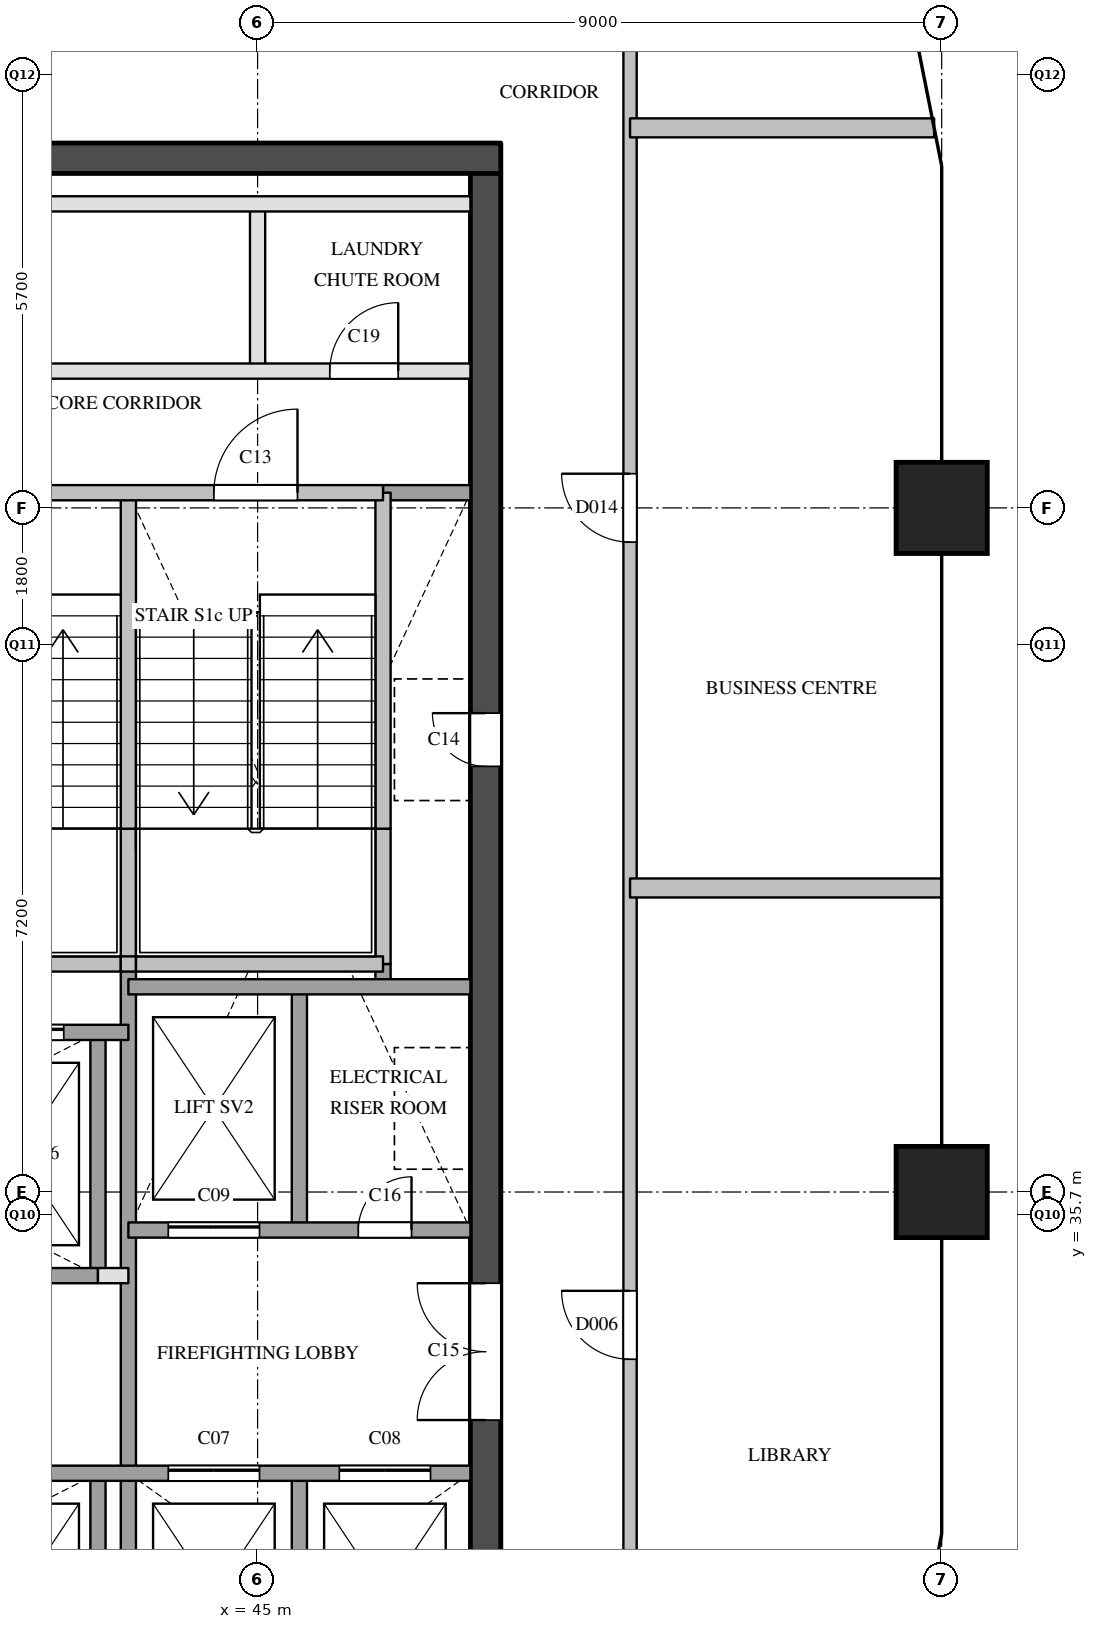
"""IFC4 building model, lengths in metres.
Left out: names, types, materials, properties, quantities, classifications, styles, units other than length and angle.
Written with IfcOpenShell. Run it as: python <this file> out.ifc"""

import sys

from ifc_helpers import new_model, si_unit, direction, frame, frame_2d, origin, origin_2d, place, context, subcontext, project, spatial, rectangle, extrude, element, fill, save


model = new_model("IFC4")
c1 = context("Model", 3, precision=1e-05, world=origin(), true_north=direction((0.0, 1.0)))
c2 = subcontext(c1, "Body", "Model", "MODEL_VIEW")
j1 = project(units=[si_unit("LENGTHUNIT", "METRE"), si_unit("PLANEANGLEUNIT", "RADIAN")], contexts=[c1])
p1 = place(None, origin())
s1 = spatial("IfcSite", under=j1, at=p1, CompositionType="ELEMENT")
p2 = place(p1, origin())
s2 = spatial("IfcBuilding", under=s1, at=p2, CompositionType="ELEMENT")
p3 = place(p2, frame((0.0, 0.0, 242.3)))
s3 = spatial("IfcBuildingStorey", under=s2, at=p3, CompositionType="ELEMENT", Elevation=242.3)
for number, where, z_axis, x_axis in (
    (1, (54.0, 36.0, 0.0), (0.0, 0.0, 1.0), (1.0, 0.0, 0.0)),
    (2, (54.0, 45.0, 0.0), (0.0, 0.0, 1.0), (1.0, 0.0, 0.0)),
):
    element("IfcColumn", number, at=place(p3, frame(where, z_axis=z_axis, x_axis=x_axis)), inside=s3, PredefinedType="COLUMN", context=c2, shape_type="SweptSolid", body=[
        extrude(rectangle(XDim=1.2, YDim=1.2, at=origin_2d()), origin(), (0.0, 0.0, 1.0), 3.9),
    ])
p4 = place(p3, frame((36.2, 49.6, 0.0), z_axis=(0.0, 0.0, 1.0), x_axis=(1.0, 0.0, 0.0)))
e3 = element("IfcWall", 3, at=p4, inside=s3, PredefinedType="SHEAR", context=c2, shape_type="SweptSolid", body=[
    extrude(rectangle(XDim=12.0, YDim=0.4, at=frame_2d((6.0, 0.0))), origin(), (0.0, 0.0, 1.0), 3.6),
])
p5 = place(p3, frame((48.0, 29.1, 0.0), z_axis=(0.0, 0.0, 1.0), x_axis=(0.0, 1.0, 0.0)))
e4 = element("IfcWall", 4, at=p5, inside=s3, PredefinedType="SHEAR", context=c2, shape_type="SweptSolid", body=[
    extrude(rectangle(XDim=20.3, YDim=0.4, at=frame_2d((10.15, 0.0))), origin(), (0.0, 0.0, 1.0), 3.6),
])
p6 = place(p5, frame((12.5, 0.0, 0.0)))
e5 = element("IfcOpeningElement", 5, at=p6, cuts=e4, PredefinedType="OPENING", context=c2, shape_type="SweptSolid", body=[
    extrude(rectangle(XDim=0.7, YDim=2.1, at=frame_2d((0.35, 1.05))), frame((0.0, 0.21, 0.0), z_axis=(0.0, -1.0, 0.0), x_axis=(1.0, 0.0, 0.0)), (0.0, 0.0, 1.0), 0.42),
])
p7 = place(p5, frame((3.9, 0.0, 0.0)))
e6 = element("IfcOpeningElement", 6, at=p7, cuts=e4, PredefinedType="OPENING", context=c2, shape_type="SweptSolid", body=[
    extrude(rectangle(XDim=1.8, YDim=2.1, at=frame_2d((0.9, 1.05))), frame((0.0, 0.21, 0.0), z_axis=(0.0, -1.0, 0.0), x_axis=(1.0, 0.0, 0.0)), (0.0, 0.0, 1.0), 0.42),
])
p8 = place(p3, frame((42.9, 29.1, 0.0), z_axis=(0.0, 0.0, 1.0), x_axis=(0.0, 1.0, 0.0)))
e7 = element("IfcWall", 7, at=p8, inside=s3, PredefinedType="SOLIDWALL", context=c2, shape_type="SweptSolid", body=[
    extrude(rectangle(XDim=3.2, YDim=0.2, at=frame_2d((1.6, 0.0))), origin(), (0.0, 0.0, 1.0), 3.6),
])
p9 = place(p3, frame((42.9, 34.9, 0.0), z_axis=(0.0, 0.0, 1.0), x_axis=(0.0, 1.0, 0.0)))
e8 = element("IfcWall", 8, at=p9, inside=s3, PredefinedType="SOLIDWALL", context=c2, shape_type="SweptSolid", body=[
    extrude(rectangle(XDim=3.2, YDim=0.2, at=frame_2d((1.6, 0.0))), origin(), (0.0, 0.0, 1.0), 3.6),
])
p10 = place(p3, frame((43.3, 29.1, 0.0), z_axis=(0.0, 0.0, 1.0), x_axis=(0.0, 1.0, 0.0)))
e9 = element("IfcWall", 9, at=p10, inside=s3, PredefinedType="SOLIDWALL", context=c2, shape_type="SweptSolid", body=[
    extrude(rectangle(XDim=9.9, YDim=0.2, at=frame_2d((4.95, 0.0))), origin(), (0.0, 0.0, 1.0), 3.6),
])
p11 = place(p3, frame((43.3, 39.0, 0.0), z_axis=(0.0, 0.0, 1.0), x_axis=(0.0, 1.0, 0.0)))
e10 = element("IfcWall", 10, at=p11, inside=s3, PredefinedType="SOLIDWALL", context=c2, shape_type="SweptSolid", body=[
    extrude(rectangle(XDim=1.78, YDim=0.2, at=frame_2d((0.89, 0.0))), origin(), (0.0, 0.0, 1.0), 3.6),
])
p12 = place(p3, frame((43.3, 40.78, 0.0), z_axis=(0.0, 0.0, 1.0), x_axis=(0.0, 1.0, 0.0)))
e11 = element("IfcWall", 11, at=p12, inside=s3, PredefinedType="SOLIDWALL", context=c2, shape_type="SweptSolid", body=[
    extrude(rectangle(XDim=4.42, YDim=0.2, at=frame_2d((2.21, 0.0))), origin(), (0.0, 0.0, 1.0), 3.6),
])
p13 = place(p3, frame((45.0, 46.8, 0.0), z_axis=(0.0, 0.0, 1.0), x_axis=(0.0, 1.0, 0.0)))
e12 = element("IfcWall", 12, at=p13, inside=s3, PredefinedType="PARTITIONING", context=c2, shape_type="SweptSolid", body=[
    extrude(rectangle(XDim=2.2, YDim=0.2, at=frame_2d((1.1, 0.0))), origin(), (0.0, 0.0, 1.0), 3.6),
])
for number, where, z_axis, x_axis in (
    (13, (45.55, 29.1, 0.0), (0.0, 0.0, 1.0), (0.0, 1.0, 0.0)),
    (14, (45.55, 35.5, 0.0), (0.0, 0.0, 1.0), (0.0, 1.0, 0.0)),
):
    element("IfcWall", number, at=place(p3, frame(where, z_axis=z_axis, x_axis=x_axis)), inside=s3, PredefinedType="SOLIDWALL", context=c2, shape_type="SweptSolid", body=[
        extrude(rectangle(XDim=3.2, YDim=0.2, at=frame_2d((1.6, 0.0))), origin(), (0.0, 0.0, 1.0), 3.6),
    ])
p14 = place(p3, frame((46.65, 38.7, 0.0), z_axis=(0.0, 0.0, 1.0), x_axis=(0.0, 1.0, 0.0)))
e15 = element("IfcWall", 15, at=p14, inside=s3, PredefinedType="SOLIDWALL", context=c2, shape_type="SweptSolid", body=[
    extrude(rectangle(XDim=0.3, YDim=0.2, at=frame_2d((0.15, 0.0))), origin(), (0.0, 0.0, 1.0), 3.6),
])
p15 = place(p3, frame((46.65, 39.0, 0.0), z_axis=(0.0, 0.0, 1.0), x_axis=(0.0, 1.0, 0.0)))
e16 = element("IfcWall", 16, at=p15, inside=s3, PredefinedType="SOLIDWALL", context=c2, shape_type="SweptSolid", body=[
    extrude(rectangle(XDim=1.78, YDim=0.2, at=frame_2d((0.89, 0.0))), origin(), (0.0, 0.0, 1.0), 3.6),
])
p16 = place(p3, frame((46.65, 40.78, 0.0), z_axis=(0.0, 0.0, 1.0), x_axis=(0.0, 1.0, 0.0)))
e17 = element("IfcWall", 17, at=p16, inside=s3, PredefinedType="SOLIDWALL", context=c2, shape_type="SweptSolid", body=[
    extrude(rectangle(XDim=4.42, YDim=0.2, at=frame_2d((2.21, 0.0))), origin(), (0.0, 0.0, 1.0), 3.6),
])
p17 = place(p3, frame((36.6, 32.3, 0.0), z_axis=(0.0, 0.0, 1.0), x_axis=(1.0, 0.0, 0.0)))
e18 = element("IfcWall", 18, at=p17, inside=s3, PredefinedType="SOLIDWALL", context=c2, shape_type="SweptSolid", body=[
    extrude(rectangle(XDim=11.2, YDim=0.2, at=frame_2d((5.6, 0.0))), origin(), (0.0, 0.0, 1.0), 3.6),
])
p18 = place(p17, frame((7.225, 0.0, 0.0)))
e19 = element("IfcOpeningElement", 19, at=p18, cuts=e18, PredefinedType="OPENING", context=c2, shape_type="SweptSolid", body=[
    extrude(rectangle(XDim=1.2, YDim=2.1, at=frame_2d((0.6, 1.05))), frame((0.0, 0.11, 0.0), z_axis=(0.0, -1.0, 0.0), x_axis=(1.0, 0.0, 0.0)), (0.0, 0.0, 1.0), 0.22),
])
p19 = place(p17, frame((9.475, 0.0, 0.0)))
e20 = element("IfcOpeningElement", 20, at=p19, cuts=e18, PredefinedType="OPENING", context=c2, shape_type="SweptSolid", body=[
    extrude(rectangle(XDim=1.2, YDim=2.1, at=frame_2d((0.6, 1.05))), frame((0.0, 0.11, 0.0), z_axis=(0.0, -1.0, 0.0), x_axis=(1.0, 0.0, 0.0)), (0.0, 0.0, 1.0), 0.22),
])
p20 = place(p3, frame((42.9, 34.9, 0.0), z_axis=(0.0, 0.0, 1.0), x_axis=(1.0, 0.0, 0.0)))
e21 = element("IfcWall", 21, at=p20, inside=s3, PredefinedType="PARTITIONING", context=c2, shape_type="SweptSolid", body=[
    extrude(rectangle(XDim=0.4, YDim=0.2, at=frame_2d((0.2, 0.0))), origin(), (0.0, 0.0, 1.0), 3.6),
])
p21 = place(p3, frame((36.6, 34.9, 0.0), z_axis=(0.0, 0.0, 1.0), x_axis=(1.0, 0.0, 0.0)))
e22 = element("IfcWall", 22, at=p21, inside=s3, PredefinedType="SOLIDWALL", context=c2, shape_type="SweptSolid", body=[
    extrude(rectangle(XDim=6.3, YDim=0.2, at=frame_2d((3.15, 0.0))), origin(), (0.0, 0.0, 1.0), 3.6),
])
p22 = place(p3, frame((43.3, 35.5, 0.0), z_axis=(0.0, 0.0, 1.0), x_axis=(1.0, 0.0, 0.0)))
e23 = element("IfcWall", 23, at=p22, inside=s3, PredefinedType="SOLIDWALL", context=c2, shape_type="SweptSolid", body=[
    extrude(rectangle(XDim=4.5, YDim=0.2, at=frame_2d((2.25, 0.0))), origin(), (0.0, 0.0, 1.0), 3.6),
])
p23 = place(p22, frame((0.525, 0.0, 0.0)))
e24 = element("IfcOpeningElement", 24, at=p23, cuts=e23, PredefinedType="OPENING", context=c2, shape_type="SweptSolid", body=[
    extrude(rectangle(XDim=1.2, YDim=2.1, at=frame_2d((0.6, 1.05))), frame((0.0, 0.11, 0.0), z_axis=(0.0, -1.0, 0.0), x_axis=(1.0, 0.0, 0.0)), (0.0, 0.0, 1.0), 0.22),
])
p24 = place(p22, frame((3.025, 0.0, 0.0)))
e25 = element("IfcOpeningElement", 25, at=p24, cuts=e23, PredefinedType="OPENING", context=c2, shape_type="SweptSolid", body=[
    extrude(rectangle(XDim=0.7, YDim=2.1, at=frame_2d((0.35, 1.05))), frame((0.0, 0.11, 0.0), z_axis=(0.0, -1.0, 0.0), x_axis=(1.0, 0.0, 0.0)), (0.0, 0.0, 1.0), 0.22),
])
p25 = place(p3, frame((36.6, 38.1, 0.0), z_axis=(0.0, 0.0, 1.0), x_axis=(1.0, 0.0, 0.0)))
e26 = element("IfcWall", 26, at=p25, inside=s3, PredefinedType="SOLIDWALL", context=c2, shape_type="SweptSolid", body=[
    extrude(rectangle(XDim=6.7, YDim=0.2, at=frame_2d((3.35, 0.0))), origin(), (0.0, 0.0, 1.0), 3.6),
])
p26 = place(p25, frame((0.45, 0.0, 0.0)))
e27 = element("IfcOpeningElement", 27, at=p26, cuts=e26, PredefinedType="OPENING", context=c2, shape_type="SweptSolid", body=[
    extrude(rectangle(XDim=1.2, YDim=2.1, at=frame_2d((0.6, 1.05))), frame((0.0, 0.11, 0.0), z_axis=(0.0, -1.0, 0.0), x_axis=(1.0, 0.0, 0.0)), (0.0, 0.0, 1.0), 0.22),
])
p27 = place(p25, frame((2.55, 0.0, 0.0)))
e28 = element("IfcOpeningElement", 28, at=p27, cuts=e26, PredefinedType="OPENING", context=c2, shape_type="SweptSolid", body=[
    extrude(rectangle(XDim=1.2, YDim=2.1, at=frame_2d((0.6, 1.05))), frame((0.0, 0.11, 0.0), z_axis=(0.0, -1.0, 0.0), x_axis=(1.0, 0.0, 0.0)), (0.0, 0.0, 1.0), 0.22),
])
p28 = place(p25, frame((4.65, 0.0, 0.0)))
e29 = element("IfcOpeningElement", 29, at=p28, cuts=e26, PredefinedType="OPENING", context=c2, shape_type="SweptSolid", body=[
    extrude(rectangle(XDim=1.2, YDim=2.1, at=frame_2d((0.6, 1.05))), frame((0.0, 0.11, 0.0), z_axis=(0.0, -1.0, 0.0), x_axis=(1.0, 0.0, 0.0)), (0.0, 0.0, 1.0), 0.22),
])
p29 = place(p3, frame((43.3, 38.7, 0.0), z_axis=(0.0, 0.0, 1.0), x_axis=(1.0, 0.0, 0.0)))
e30 = element("IfcWall", 30, at=p29, inside=s3, PredefinedType="SOLIDWALL", context=c2, shape_type="SweptSolid", body=[
    extrude(rectangle(XDim=4.5, YDim=0.2, at=frame_2d((2.25, 0.0))), origin(), (0.0, 0.0, 1.0), 3.6),
])
p30 = place(p3, frame((40.05, 39.0, 0.0), z_axis=(0.0, 0.0, 1.0), x_axis=(1.0, 0.0, 0.0)))
e31 = element("IfcWall", 31, at=p30, inside=s3, PredefinedType="SOLIDWALL", context=c2, shape_type="SweptSolid", body=[
    extrude(rectangle(XDim=3.15, YDim=0.2, at=frame_2d((1.575, 0.0))), origin(), (0.0, 0.0, 1.0), 3.6),
])
p31 = place(p3, frame((43.2, 39.0, 0.0), z_axis=(0.0, 0.0, 1.0), x_axis=(1.0, 0.0, 0.0)))
e32 = element("IfcWall", 32, at=p31, inside=s3, PredefinedType="SOLIDWALL", context=c2, shape_type="SweptSolid", body=[
    extrude(rectangle(XDim=0.2, YDim=0.2, at=frame_2d((0.1, 0.0))), origin(), (0.0, 0.0, 1.0), 3.6),
])
p32 = place(p3, frame((43.4, 39.0, 0.0), z_axis=(0.0, 0.0, 1.0), x_axis=(1.0, 0.0, 0.0)))
e33 = element("IfcWall", 33, at=p32, inside=s3, PredefinedType="SOLIDWALL", context=c2, shape_type="SweptSolid", body=[
    extrude(rectangle(XDim=3.25, YDim=0.2, at=frame_2d((1.625, 0.0))), origin(), (0.0, 0.0, 1.0), 3.6),
])
p33 = place(p3, frame((46.65, 45.2, 0.0), z_axis=(0.0, 0.0, 1.0), x_axis=(1.0, 0.0, 0.0)))
e34 = element("IfcWall", 34, at=p33, inside=s3, PredefinedType="SOLIDWALL", context=c2, shape_type="SweptSolid", body=[
    extrude(rectangle(XDim=1.15, YDim=0.2, at=frame_2d((0.575, 0.0))), origin(), (0.0, 0.0, 1.0), 3.6),
])
p34 = place(p3, frame((36.6, 45.2, 0.0), z_axis=(0.0, 0.0, 1.0), x_axis=(1.0, 0.0, 0.0)))
e35 = element("IfcWall", 35, at=p34, inside=s3, PredefinedType="SOLIDWALL", context=c2, shape_type="SweptSolid", body=[
    extrude(rectangle(XDim=10.05, YDim=0.2, at=frame_2d((5.025, 0.0))), origin(), (0.0, 0.0, 1.0), 3.6),
])
p35 = place(p34, frame((1.125, 0.0, 0.0)))
e36 = element("IfcOpeningElement", 36, at=p35, cuts=e35, PredefinedType="OPENING", context=c2, shape_type="SweptSolid", body=[
    extrude(rectangle(XDim=1.1, YDim=2.1, at=frame_2d((0.55, 1.05))), frame((0.0, 0.11, 0.0), z_axis=(0.0, -1.0, 0.0), x_axis=(1.0, 0.0, 0.0)), (0.0, 0.0, 1.0), 0.22),
])
p36 = place(p34, frame((4.475, 0.0, 0.0)))
e37 = element("IfcOpeningElement", 37, at=p36, cuts=e35, PredefinedType="OPENING", context=c2, shape_type="SweptSolid", body=[
    extrude(rectangle(XDim=1.1, YDim=2.1, at=frame_2d((0.55, 1.05))), frame((0.0, 0.11, 0.0), z_axis=(0.0, -1.0, 0.0), x_axis=(1.0, 0.0, 0.0)), (0.0, 0.0, 1.0), 0.22),
])
p37 = place(p34, frame((7.825, 0.0, 0.0)))
e38 = element("IfcOpeningElement", 38, at=p37, cuts=e35, PredefinedType="OPENING", context=c2, shape_type="SweptSolid", body=[
    extrude(rectangle(XDim=1.1, YDim=2.1, at=frame_2d((0.55, 1.05))), frame((0.0, 0.11, 0.0), z_axis=(0.0, -1.0, 0.0), x_axis=(1.0, 0.0, 0.0)), (0.0, 0.0, 1.0), 0.22),
])
p38 = place(p3, frame((36.6, 46.8, 0.0), z_axis=(0.0, 0.0, 1.0), x_axis=(1.0, 0.0, 0.0)))
e39 = element("IfcWall", 39, at=p38, inside=s3, PredefinedType="PARTITIONING", context=c2, shape_type="SweptSolid", body=[
    extrude(rectangle(XDim=11.2, YDim=0.2, at=frame_2d((5.6, 0.0))), origin(), (0.0, 0.0, 1.0), 3.6),
])
p39 = place(p38, frame((3.75, 0.0, 0.0)))
e40 = element("IfcOpeningElement", 40, at=p39, cuts=e39, PredefinedType="OPENING", context=c2, shape_type="SweptSolid", body=[
    extrude(rectangle(XDim=0.9, YDim=2.1, at=frame_2d((0.45, 1.05))), frame((0.0, 0.11, 0.0), z_axis=(0.0, -1.0, 0.0), x_axis=(1.0, 0.0, 0.0)), (0.0, 0.0, 1.0), 0.22),
])
p40 = place(p38, frame((9.35, 0.0, 0.0)))
e41 = element("IfcOpeningElement", 41, at=p40, cuts=e39, PredefinedType="OPENING", context=c2, shape_type="SweptSolid", body=[
    extrude(rectangle(XDim=0.9, YDim=2.1, at=frame_2d((0.45, 1.05))), frame((0.0, 0.11, 0.0), z_axis=(0.0, -1.0, 0.0), x_axis=(1.0, 0.0, 0.0)), (0.0, 0.0, 1.0), 0.22),
])
p41 = place(p3, frame((36.6, 49.0, 0.0), z_axis=(0.0, 0.0, 1.0), x_axis=(1.0, 0.0, 0.0)))
e42 = element("IfcWall", 42, at=p41, inside=s3, PredefinedType="PARTITIONING", context=c2, shape_type="SweptSolid", body=[
    extrude(rectangle(XDim=11.2, YDim=0.2, at=frame_2d((5.6, 0.0))), origin(), (0.0, 0.0, 1.0), 3.6),
])
p42 = place(p3, frame((49.9, 28.5, 0.0), z_axis=(0.0, 0.0, 1.0), x_axis=(0.0, 1.0, 0.0)))
e43 = element("IfcWall", 43, at=p42, inside=s3, PredefinedType="PARTITIONING", context=c2, shape_type="SweptSolid", body=[
    extrude(rectangle(XDim=23.0, YDim=0.175, at=frame_2d((11.5, 0.0))), origin(), (0.0, 0.0, 1.0), 3.6),
])
p43 = place(p42, frame((5.3, 0.0, 0.0)))
e44 = element("IfcOpeningElement", 44, at=p43, cuts=e43, PredefinedType="OPENING", context=c2, shape_type="SweptSolid", body=[
    extrude(rectangle(XDim=0.9, YDim=2.1, at=frame_2d((0.45, 1.05))), frame((0.0, 0.097, 0.0), z_axis=(0.0, -1.0, 0.0), x_axis=(1.0, 0.0, 0.0)), (0.0, 0.0, 1.0), 0.195),
])
p44 = place(p42, frame((16.05, 0.0, 0.0)))
e45 = element("IfcOpeningElement", 45, at=p44, cuts=e43, PredefinedType="OPENING", context=c2, shape_type="SweptSolid", body=[
    extrude(rectangle(XDim=0.9, YDim=2.1, at=frame_2d((0.45, 1.05))), frame((0.0, 0.097, 0.0), z_axis=(0.0, -1.0, 0.0), x_axis=(1.0, 0.0, 0.0)), (0.0, 0.0, 1.0), 0.195),
])
p45 = place(p3, frame((49.9, 40.0, 0.0), z_axis=(0.0, 0.0, 1.0), x_axis=(1.0, 0.0, 0.0)))
e46 = element("IfcWall", 46, at=p45, inside=s3, PredefinedType="PARTITIONING", context=c2, shape_type="SweptSolid", body=[
    extrude(rectangle(XDim=4.1, YDim=0.25, at=frame_2d((2.05, 0.0))), origin(), (0.0, 0.0, 1.0), 2.6),
])
p46 = place(p3, frame((49.9, 50.0, 0.0), z_axis=(0.0, 0.0, 1.0), x_axis=(1.0, 0.0, 0.0)))
e47 = element("IfcWall", 47, at=p46, inside=s3, PredefinedType="PARTITIONING", context=c2, shape_type="SweptSolid", body=[
    extrude(rectangle(XDim=4.0, YDim=0.25, at=frame_2d((2.0, 0.0))), origin(), (0.0, 0.0, 1.0), 2.6),
])
p47 = place(p28, origin())
e48 = element("IfcDoor", 48, at=p47, inside=s3, OperationType="SLIDING_TO_LEFT", PredefinedType="DOOR", context=c2, shape_type="SweptSolid", body=[
    extrude(rectangle(XDim=1.2, YDim=2.1, at=frame_2d((0.6, 1.05))), frame((0.0, 0.025, 0.0), z_axis=(0.0, -1.0, 0.0), x_axis=(1.0, 0.0, 0.0)), (0.0, 0.0, 1.0), 0.05),
])
fill(e29, e48)
p48 = place(p18, origin())
e49 = element("IfcDoor", 49, at=p48, inside=s3, OperationType="SLIDING_TO_LEFT", PredefinedType="DOOR", context=c2, shape_type="SweptSolid", body=[
    extrude(rectangle(XDim=1.2, YDim=2.1, at=frame_2d((0.6, 1.05))), frame((0.0, 0.025, 0.0), z_axis=(0.0, -1.0, 0.0), x_axis=(1.0, 0.0, 0.0)), (0.0, 0.0, 1.0), 0.05),
])
fill(e19, e49)
p49 = place(p19, origin())
e50 = element("IfcDoor", 50, at=p49, inside=s3, OperationType="SLIDING_TO_LEFT", PredefinedType="DOOR", context=c2, shape_type="SweptSolid", body=[
    extrude(rectangle(XDim=1.2, YDim=2.1, at=frame_2d((0.6, 1.05))), frame((0.0, 0.025, 0.0), z_axis=(0.0, -1.0, 0.0), x_axis=(1.0, 0.0, 0.0)), (0.0, 0.0, 1.0), 0.05),
])
fill(e20, e50)
p50 = place(p23, origin())
e51 = element("IfcDoor", 51, at=p50, inside=s3, OperationType="SLIDING_TO_LEFT", PredefinedType="DOOR", context=c2, shape_type="SweptSolid", body=[
    extrude(rectangle(XDim=1.2, YDim=2.1, at=frame_2d((0.6, 1.05))), frame((0.0, 0.025, 0.0), z_axis=(0.0, -1.0, 0.0), x_axis=(1.0, 0.0, 0.0)), (0.0, 0.0, 1.0), 0.05),
])
fill(e24, e51)
p51 = place(p37, origin())
e52 = element("IfcDoor", 52, at=p51, inside=s3, OperationType="SINGLE_SWING_RIGHT", PredefinedType="DOOR", context=c2, shape_type="SweptSolid", body=[
    extrude(rectangle(XDim=1.1, YDim=2.1, at=frame_2d((0.55, 1.05))), frame((0.0, 0.025, 0.0), z_axis=(0.0, -1.0, 0.0), x_axis=(1.0, 0.0, 0.0)), (0.0, 0.0, 1.0), 0.05),
])
fill(e38, e52)
p52 = place(p6, origin())
e53 = element("IfcDoor", 53, at=p52, inside=s3, OperationType="SINGLE_SWING_RIGHT", PredefinedType="DOOR", context=c2, shape_type="SweptSolid", body=[
    extrude(rectangle(XDim=0.7, YDim=2.1, at=frame_2d((0.35, 1.05))), frame((0.0, 0.025, 0.0), z_axis=(0.0, -1.0, 0.0), x_axis=(1.0, 0.0, 0.0)), (0.0, 0.0, 1.0), 0.05),
])
fill(e5, e53)
p53 = place(p7, origin())
e54 = element("IfcDoor", 54, at=p53, inside=s3, OperationType="DOUBLE_DOOR_SINGLE_SWING", PredefinedType="DOOR", context=c2, shape_type="SweptSolid", body=[
    extrude(rectangle(XDim=1.8, YDim=2.1, at=frame_2d((0.9, 1.05))), frame((0.0, 0.025, 0.0), z_axis=(0.0, -1.0, 0.0), x_axis=(1.0, 0.0, 0.0)), (0.0, 0.0, 1.0), 0.05),
])
fill(e6, e54)
p54 = place(p24, origin())
e55 = element("IfcDoor", 55, at=p54, inside=s3, OperationType="SINGLE_SWING_RIGHT", PredefinedType="DOOR", context=c2, shape_type="SweptSolid", body=[
    extrude(rectangle(XDim=0.7, YDim=2.1, at=frame_2d((0.35, 1.05))), frame((0.0, 0.025, 0.0), z_axis=(0.0, -1.0, 0.0), x_axis=(1.0, 0.0, 0.0)), (0.0, 0.0, 1.0), 0.05),
])
fill(e25, e55)
p55 = place(p40, origin())
e56 = element("IfcDoor", 56, at=p55, inside=s3, OperationType="SINGLE_SWING_RIGHT", PredefinedType="DOOR", context=c2, shape_type="SweptSolid", body=[
    extrude(rectangle(XDim=0.9, YDim=2.1, at=frame_2d((0.45, 1.05))), frame((0.0, 0.025, 0.0), z_axis=(0.0, -1.0, 0.0), x_axis=(1.0, 0.0, 0.0)), (0.0, 0.0, 1.0), 0.05),
])
fill(e41, e56)
p56 = place(p43, origin())
e57 = element("IfcDoor", 57, at=p56, inside=s3, OperationType="SINGLE_SWING_RIGHT", PredefinedType="DOOR", context=c2, shape_type="SweptSolid", body=[
    extrude(rectangle(XDim=0.9, YDim=2.1, at=frame_2d((0.45, 1.05))), frame((0.0, 0.025, 0.0), z_axis=(0.0, -1.0, 0.0), x_axis=(1.0, 0.0, 0.0)), (0.0, 0.0, 1.0), 0.05),
])
fill(e44, e57)
p57 = place(p44, origin())
e58 = element("IfcDoor", 58, at=p57, inside=s3, OperationType="SINGLE_SWING_RIGHT", PredefinedType="DOOR", context=c2, shape_type="SweptSolid", body=[
    extrude(rectangle(XDim=0.9, YDim=2.1, at=frame_2d((0.45, 1.05))), frame((0.0, 0.025, 0.0), z_axis=(0.0, -1.0, 0.0), x_axis=(1.0, 0.0, 0.0)), (0.0, 0.0, 1.0), 0.05),
])
fill(e45, e58)
save(model, sys.argv[1])
